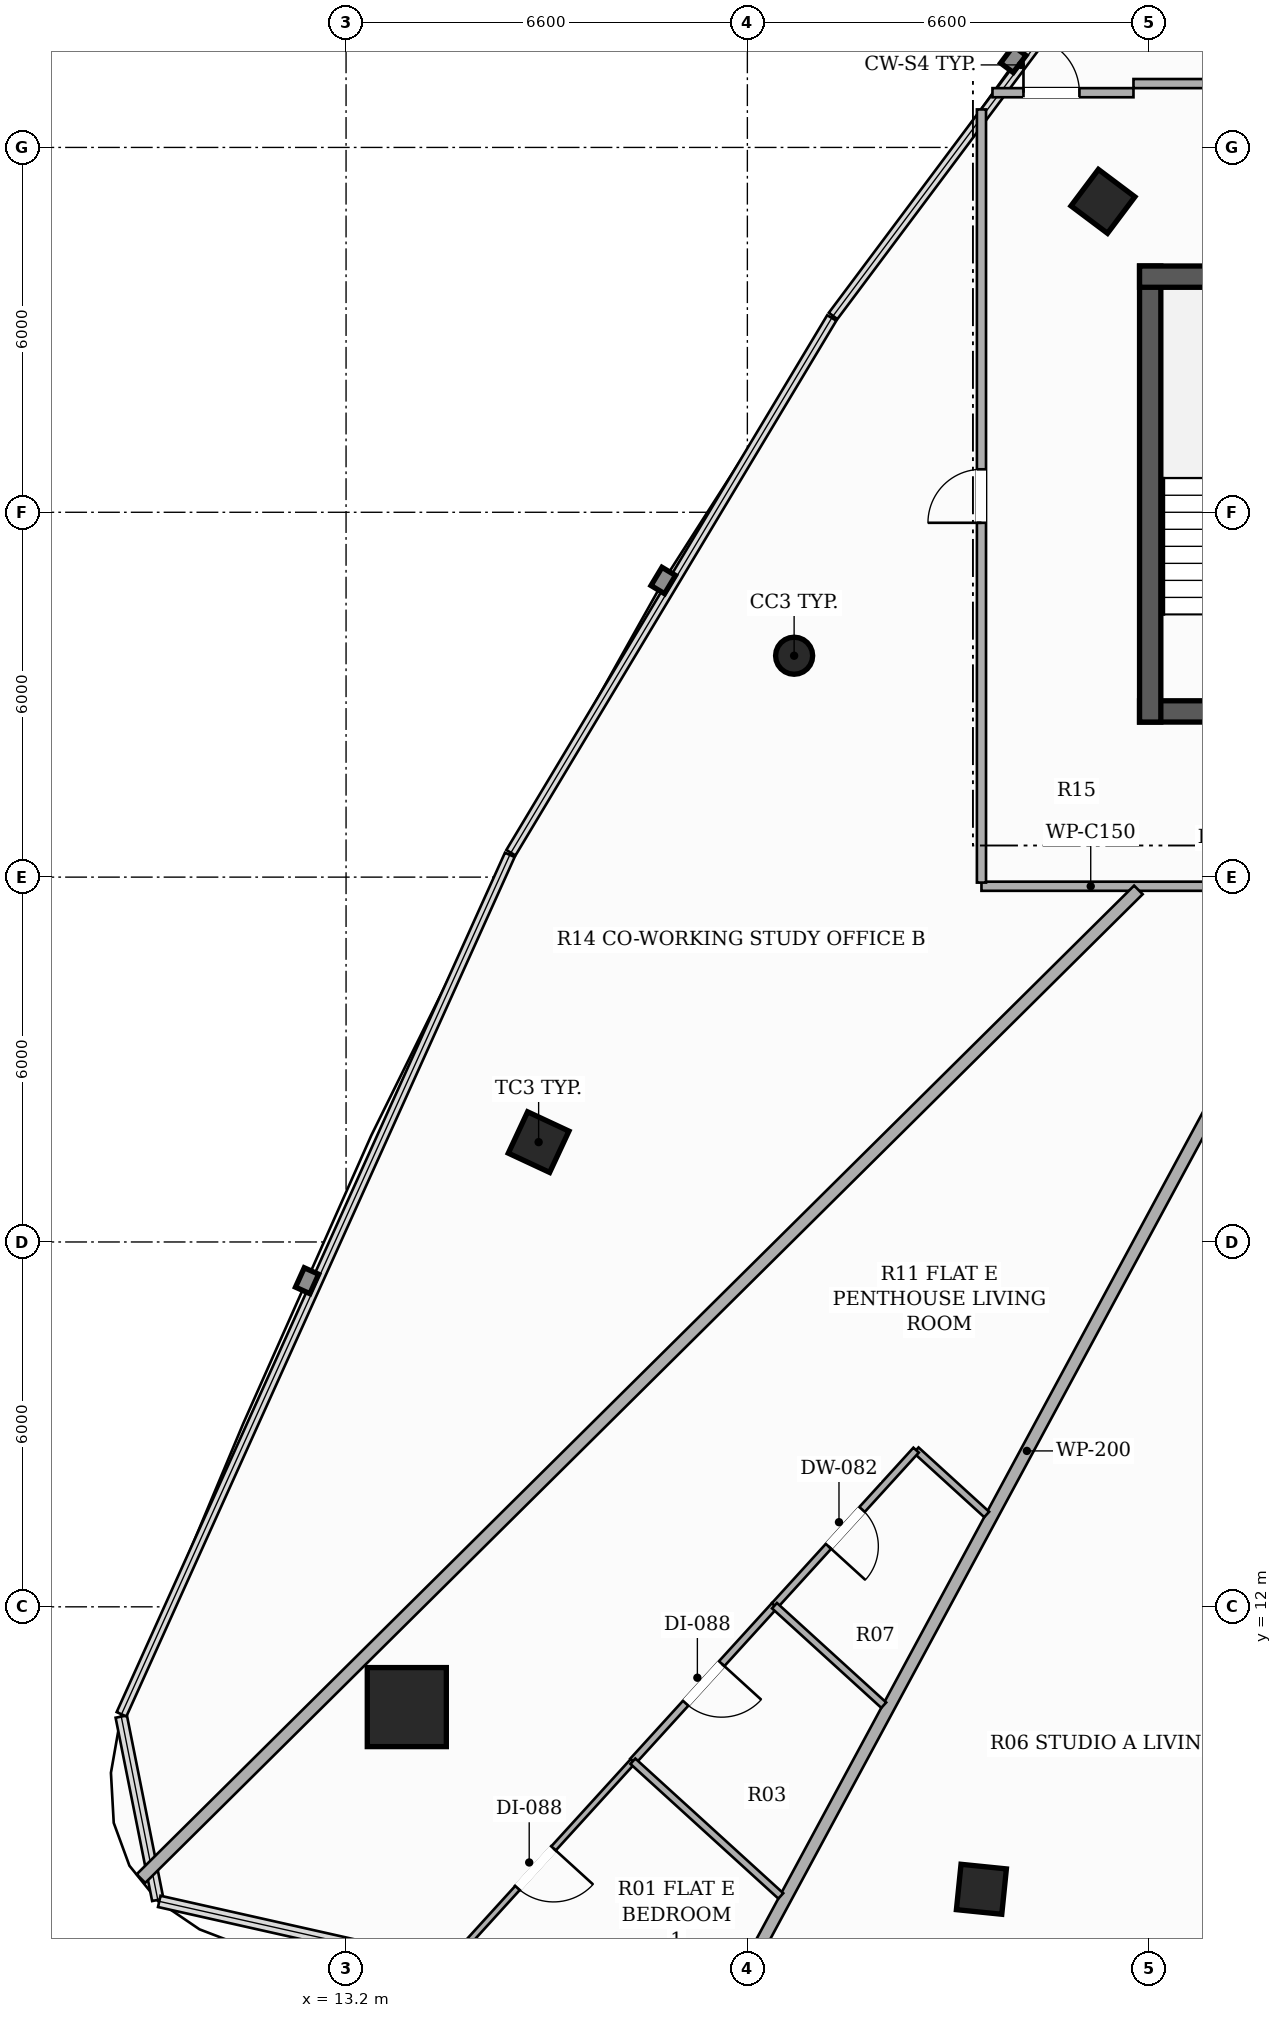
"""IFC4 building model, lengths in metres.
Left out: names, types, materials, properties, quantities, classifications, styles, units other than length and angle.
Written with IfcOpenShell. Run it as: python <this file> out.ifc"""

import sys

from ifc_helpers import new_model, si_unit, direction, frame, frame_2d, origin, origin_2d, place, context, subcontext, project, spatial, rectangle, hollow_rectangle, hollow_circle, extrude, element, fill, save


model = new_model("IFC4")
c1 = context("Model", 3, precision=1e-05, world=origin(), true_north=direction((0.0, 1.0)))
c2 = subcontext(c1, "Body", "Model", "MODEL_VIEW")
j1 = project(units=[si_unit("LENGTHUNIT", "METRE"), si_unit("PLANEANGLEUNIT", "RADIAN")], contexts=[c1])
p1 = place(None, origin())
s1 = spatial("IfcSite", under=j1, at=p1, CompositionType="ELEMENT")
p2 = place(p1, origin())
s2 = spatial("IfcBuilding", under=s1, at=p2, CompositionType="ELEMENT")
p3 = place(p2, frame((0.0, 0.0, 196.4)))
s3 = spatial("IfcBuildingStorey", under=s2, at=p3, CompositionType="ELEMENT", Elevation=196.4)
p4 = place(p3, frame((26.25, 26.725, 0.0), z_axis=(0.0, 0.0, 1.0), x_axis=(1.0, 0.0, 0.0)))
e1 = element("IfcWall", 1, at=p4, inside=s3, PredefinedType="SHEAR", context=c2, shape_type="SweptSolid", body=[
    extrude(rectangle(XDim=13.5, YDim=0.35, at=frame_2d((6.75, 0.0))), origin(), (0.0, 0.0, 1.0), 3.3),
])
p5 = place(p4, frame((4.35, 0.0, 0.0)))
e2 = element("IfcOpeningElement", 2, at=p5, cuts=e1, PredefinedType="OPENING", context=c2, shape_type="SweptSolid", body=[
    extrude(rectangle(XDim=1.05, YDim=2.15, at=frame_2d((0.525, 1.075))), frame((0.0, 0.185, 0.0), z_axis=(0.0, -1.0, 0.0), x_axis=(1.0, 0.0, 0.0)), (0.0, 0.0, 1.0), 0.37),
])
p6 = place(p4, frame((8.3, 0.0, 0.0)))
e3 = element("IfcOpeningElement", 3, at=p6, cuts=e1, PredefinedType="OPENING", context=c2, shape_type="SweptSolid", body=[
    extrude(rectangle(XDim=1.05, YDim=2.15, at=frame_2d((0.525, 1.075))), frame((0.0, 0.185, 0.0), z_axis=(0.0, -1.0, 0.0), x_axis=(1.0, 0.0, 0.0)), (0.0, 0.0, 1.0), 0.37),
])
p7 = place(p3, frame((26.425, 26.55, 0.0), z_axis=(0.0, 0.0, 1.0), x_axis=(0.0, 1.0, 0.0)))
e4 = element("IfcWall", 4, at=p7, inside=s3, PredefinedType="SHEAR", context=c2, shape_type="SweptSolid", body=[
    extrude(rectangle(XDim=7.5, YDim=0.35, at=frame_2d((3.75, 0.0))), origin(), (0.0, 0.0, 1.0), 3.3),
])
p8 = place(p3, frame((26.25, 33.875, 0.0), z_axis=(0.0, 0.0, 1.0), x_axis=(1.0, 0.0, 0.0)))
e5 = element("IfcWall", 5, at=p8, inside=s3, PredefinedType="SHEAR", context=c2, shape_type="SweptSolid", body=[
    extrude(rectangle(XDim=3.6, YDim=0.35, at=frame_2d((1.8, 0.0))), origin(), (0.0, 0.0, 1.0), 3.3),
])
p9 = place(p3, frame((14.199, 10.351, 0.0), z_axis=(0.0, 0.0, 1.0), x_axis=(1.0, 0.0, 0.0)))
e6 = element("IfcColumn", 6, at=p9, inside=s3, PredefinedType="COLUMN", context=c2, shape_type="SweptSolid", body=[
    extrude(hollow_rectangle(XDim=1.3, YDim=1.3, WallThickness=0.04, at=origin_2d()), origin(), (0.0, 0.0, 1.0), 3.3),
])
p10 = place(p3, frame((25.648, 35.113, 0.0), z_axis=(0.0, 0.0, 1.0), x_axis=(0.600420225326, 0.799684658487, 0.0)))
e7 = element("IfcColumn", 7, at=p10, inside=s3, PredefinedType="COLUMN", context=c2, shape_type="SweptSolid", body=[
    extrude(hollow_rectangle(XDim=0.75, YDim=0.75, WallThickness=0.025, at=origin_2d()), origin(), (0.0, 0.0, 1.0), 3.3),
])
p11 = place(p3, frame((20.569, 27.641, 0.0), z_axis=(0.0, 0.0, 1.0), x_axis=(1.0, 0.0, 0.0)))
e8 = element("IfcColumn", 8, at=p11, inside=s3, PredefinedType="COLUMN", context=c2, shape_type="SweptSolid", body=[
    extrude(hollow_circle(Radius=0.305, WallThickness=0.016, at=origin_2d()), origin(), (0.0, 0.0, 1.0), 3.3),
])
for number, where, z_axis, x_axis in (
    (9, (16.367, 19.642, 0.0), (0.0, 0.0, 1.0), (0.423, 0.906, 0.0)),
    (10, (23.649, 7.355, 0.0), (0.0, 0.0, 1.0), (-0.995, 0.101, 0.0)),
):
    element("IfcColumn", number, at=place(p3, frame(where, z_axis=z_axis, x_axis=x_axis)), inside=s3, PredefinedType="COLUMN", context=c2, shape_type="SweptSolid", body=[
        extrude(hollow_rectangle(XDim=0.75, YDim=0.75, WallThickness=0.025, at=origin_2d()), origin(), (0.0, 0.0, 1.0), 3.3),
    ])
p12 = place(p3, frame((32.027, 23.85, 0.0), z_axis=(0.0, 0.0, 1.0), x_axis=(-1.0, 0.0, 0.0)))
e11 = element("IfcWall", 11, at=p12, inside=s3, PredefinedType="PARTITIONING", context=c2, shape_type="SweptSolid", body=[
    extrude(rectangle(XDim=8.377, YDim=0.15, at=frame_2d((4.188, 0.0))), origin(), (0.0, 0.0, 1.0), 2.565),
])
p13 = place(p12, frame((1.014, 0.0, 0.0)))
e12 = element("IfcOpeningElement", 12, at=p13, cuts=e11, PredefinedType="OPENING", context=c2, shape_type="SweptSolid", body=[
    extrude(rectangle(XDim=0.92, YDim=2.15, at=frame_2d((0.46, 1.075))), frame((0.0, 0.085, 0.0), z_axis=(0.0, -1.0, 0.0), x_axis=(1.0, 0.0, 0.0)), (0.0, 0.0, 1.0), 0.17),
])
p14 = place(p12, frame((3.763, 0.0, 0.0)))
e13 = element("IfcOpeningElement", 13, at=p14, cuts=e11, PredefinedType="OPENING", context=c2, shape_type="SweptSolid", body=[
    extrude(rectangle(XDim=0.92, YDim=2.15, at=frame_2d((0.46, 1.075))), frame((0.0, 0.085, 0.0), z_axis=(0.0, -1.0, 0.0), x_axis=(1.0, 0.0, 0.0)), (0.0, 0.0, 1.0), 0.17),
])
p15 = place(p3, frame((23.65, 23.91, 0.0), z_axis=(0.0, 0.0, 1.0), x_axis=(0.0, 1.0, 0.0)))
e14 = element("IfcWall", 14, at=p15, inside=s3, PredefinedType="PARTITIONING", context=c2, shape_type="SweptSolid", body=[
    extrude(rectangle(XDim=12.715, YDim=0.15, at=frame_2d((6.357, 0.0))), origin(), (0.0, 0.0, 1.0), 2.492),
])
p16 = place(p15, frame((5.917, 0.0, 0.0)))
e15 = element("IfcOpeningElement", 15, at=p16, cuts=e14, PredefinedType="OPENING", context=c2, shape_type="SweptSolid", body=[
    extrude(rectangle(XDim=0.88, YDim=2.1, at=frame_2d((0.44, 1.05))), frame((0.0, 0.085, 0.0), z_axis=(0.0, -1.0, 0.0), x_axis=(1.0, 0.0, 0.0)), (0.0, 0.0, 1.0), 0.17),
])
p17 = place(p3, frame((23.831, 36.9, 0.0), z_axis=(0.0, 0.0, 1.0), x_axis=(1.0, 0.0, 0.0)))
e16 = element("IfcWall", 16, at=p17, inside=s3, PredefinedType="PARTITIONING", context=c2, shape_type="SweptSolid", body=[
    extrude(rectangle(XDim=2.319, YDim=0.15, at=frame_2d((1.159, 0.0))), origin(), (0.0, 0.0, 1.0), 2.619),
])
p18 = place(p17, frame((0.51, 0.0, 0.0)))
e17 = element("IfcOpeningElement", 17, at=p18, cuts=e16, PredefinedType="OPENING", context=c2, shape_type="SweptSolid", body=[
    extrude(rectangle(XDim=0.92, YDim=2.15, at=frame_2d((0.46, 1.075))), frame((0.0, 0.085, 0.0), z_axis=(0.0, -1.0, 0.0), x_axis=(1.0, 0.0, 0.0)), (0.0, 0.0, 1.0), 0.17),
])
p19 = place(p3, frame((26.15, 37.05, 0.0), z_axis=(0.0, 0.0, 1.0), x_axis=(1.0, 0.0, 0.0)))
e18 = element("IfcWall", 18, at=p19, inside=s3, PredefinedType="PARTITIONING", context=c2, shape_type="SweptSolid", body=[
    extrude(rectangle(XDim=4.3, YDim=0.15, at=frame_2d((2.15, 0.0))), origin(), (0.0, 0.0, 1.0), 2.425),
])
p20 = place(p3, frame((19.416, 5.338, 0.0), z_axis=(0.0, 0.0, 1.0), x_axis=(0.475065982754, 0.879950175879, 0.0)))
e19 = element("IfcWall", 19, at=p20, inside=s3, PredefinedType="PARTITIONING", context=c2, shape_type="SweptSolid", body=[
    extrude(rectangle(XDim=20.969, YDim=0.2, at=frame_2d((10.485, 0.0))), origin(), (0.0, 0.0, 1.0), 2.492),
])
p21 = place(p3, frame((26.231, 23.79, 0.0), z_axis=(0.0, 0.0, 1.0), x_axis=(-0.710239236144, -0.703960387693, 0.0)))
e20 = element("IfcWall", 20, at=p21, inside=s3, PredefinedType="PARTITIONING", context=c2, shape_type="SweptSolid", body=[
    extrude(rectangle(XDim=23.096, YDim=0.2, at=frame_2d((11.548, 0.0))), origin(), (0.0, 0.0, 1.0), 2.492),
])
p22 = place(p3, frame((23.736, 13.519, 0.0), z_axis=(0.0, 0.0, 1.0), x_axis=(-0.739215251716, 0.673469235846, 0.0)))
e21 = element("IfcWall", 21, at=p22, inside=s3, PredefinedType="PARTITIONING", context=c2, shape_type="SweptSolid", body=[
    extrude(rectangle(XDim=1.571, YDim=0.12, at=frame_2d((0.785, 0.0))), origin(), (0.0, 0.0, 1.0), 3.06),
])
p23 = place(p3, frame((22.575, 14.577, 0.0), z_axis=(0.0, 0.0, 1.0), x_axis=(-0.673231148277, -0.739432093563, 0.0)))
e22 = element("IfcWall", 22, at=p23, inside=s3, PredefinedType="PARTITIONING", context=c2, shape_type="SweptSolid", body=[
    extrude(rectangle(XDim=3.459, YDim=0.12, at=frame_2d((1.729, 0.0))), origin(), (0.0, 0.0, 1.0), 2.773),
])
p24 = place(p23, frame((1.32, 0.0, 0.0)))
e23 = element("IfcOpeningElement", 23, at=p24, cuts=e22, PredefinedType="OPENING", context=c2, shape_type="SweptSolid", body=[
    extrude(rectangle(XDim=0.82, YDim=2.1, at=frame_2d((0.41, 1.05))), frame((0.0, 0.07, 0.0), z_axis=(0.0, -1.0, 0.0), x_axis=(1.0, 0.0, 0.0)), (0.0, 0.0, 1.0), 0.14),
])
p25 = place(p3, frame((20.246, 12.019, 0.0), z_axis=(0.0, 0.0, 1.0), x_axis=(-0.673234602732, -0.739428948368, 0.0)))
e24 = element("IfcWall", 24, at=p25, inside=s3, PredefinedType="PARTITIONING", context=c2, shape_type="SweptSolid", body=[
    extrude(rectangle(XDim=3.459, YDim=0.12, at=frame_2d((1.73, 0.0))), origin(), (0.0, 0.0, 1.0), 2.492),
])
p26 = place(p25, frame((1.29, 0.0, 0.0)))
e25 = element("IfcOpeningElement", 25, at=p26, cuts=e24, PredefinedType="OPENING", context=c2, shape_type="SweptSolid", body=[
    extrude(rectangle(XDim=0.88, YDim=2.1, at=frame_2d((0.44, 1.05))), frame((0.0, 0.07, 0.0), z_axis=(0.0, -1.0, 0.0), x_axis=(1.0, 0.0, 0.0)), (0.0, 0.0, 1.0), 0.14),
])
p27 = place(p3, frame((17.917, 9.461, 0.0), z_axis=(0.0, 0.0, 1.0), x_axis=(-0.673104266943, -0.739547595374, 0.0)))
e26 = element("IfcWall", 26, at=p27, inside=s3, PredefinedType="PARTITIONING", context=c2, shape_type="SweptSolid", body=[
    extrude(rectangle(XDim=4.758, YDim=0.1, at=frame_2d((2.379, 0.0))), origin(), (0.0, 0.0, 1.0), 2.492),
])
p28 = place(p27, frame((1.939, 0.0, 0.0)))
e27 = element("IfcOpeningElement", 27, at=p28, cuts=e26, PredefinedType="OPENING", context=c2, shape_type="SweptSolid", body=[
    extrude(rectangle(XDim=0.88, YDim=2.1, at=frame_2d((0.44, 1.05))), frame((0.0, 0.06, 0.0), z_axis=(0.0, -1.0, 0.0), x_axis=(1.0, 0.0, 0.0)), (0.0, 0.0, 1.0), 0.12),
])
p29 = place(p3, frame((22.043, 10.383, 0.0), z_axis=(0.0, 0.0, 1.0), x_axis=(-0.739435258465, 0.673227672143, 0.0)))
e28 = element("IfcWall", 28, at=p29, inside=s3, PredefinedType="PARTITIONING", context=c2, shape_type="SweptSolid", body=[
    extrude(rectangle(XDim=2.43, YDim=0.12, at=frame_2d((1.215, 0.0))), origin(), (0.0, 0.0, 1.0), 2.773),
])
p30 = place(p3, frame((20.35, 7.246, 0.0), z_axis=(0.0, 0.0, 1.0), x_axis=(-0.739496715577, 0.673160164932, 0.0)))
e29 = element("IfcWall", 29, at=p30, inside=s3, PredefinedType="PARTITIONING", context=c2, shape_type="SweptSolid", body=[
    extrude(rectangle(XDim=3.29, YDim=0.12, at=frame_2d((1.645, 0.0))), origin(), (0.0, 0.0, 1.0), 2.492),
])
p31 = place(p16, origin())
e30 = element("IfcDoor", 30, at=p31, inside=s3, OperationType="SINGLE_SWING_LEFT", PredefinedType="DOOR", context=c2, shape_type="SweptSolid", body=[
    extrude(rectangle(XDim=0.88, YDim=2.1, at=frame_2d((0.44, 1.05))), frame((0.0, 0.025, 0.0), z_axis=(0.0, -1.0, 0.0), x_axis=(1.0, 0.0, 0.0)), (0.0, 0.0, 1.0), 0.05),
])
fill(e15, e30)
p32 = place(p24, origin())
e31 = element("IfcDoor", 31, at=p32, inside=s3, OperationType="SINGLE_SWING_RIGHT", PredefinedType="DOOR", context=c2, shape_type="SweptSolid", body=[
    extrude(rectangle(XDim=0.82, YDim=2.1, at=frame_2d((0.41, 1.05))), frame((0.0, 0.025, 0.0), z_axis=(0.0, -1.0, 0.0), x_axis=(1.0, 0.0, 0.0)), (0.0, 0.0, 1.0), 0.05),
])
fill(e23, e31)
p33 = place(p26, origin())
e32 = element("IfcDoor", 32, at=p33, inside=s3, OperationType="SINGLE_SWING_LEFT", PredefinedType="DOOR", context=c2, shape_type="SweptSolid", body=[
    extrude(rectangle(XDim=0.88, YDim=2.1, at=frame_2d((0.44, 1.05))), frame((0.0, 0.025, 0.0), z_axis=(0.0, -1.0, 0.0), x_axis=(1.0, 0.0, 0.0)), (0.0, 0.0, 1.0), 0.05),
])
fill(e25, e32)
p34 = place(p28, origin())
e33 = element("IfcDoor", 33, at=p34, inside=s3, OperationType="SINGLE_SWING_LEFT", PredefinedType="DOOR", context=c2, shape_type="SweptSolid", body=[
    extrude(rectangle(XDim=0.88, YDim=2.1, at=frame_2d((0.44, 1.05))), frame((0.0, 0.025, 0.0), z_axis=(0.0, -1.0, 0.0), x_axis=(1.0, 0.0, 0.0)), (0.0, 0.0, 1.0), 0.05),
])
fill(e27, e33)
p35 = place(p18, origin())
e34 = element("IfcDoor", 34, at=p35, inside=s3, OperationType="SINGLE_SWING_LEFT", PredefinedType="DOOR", context=c2, shape_type="SweptSolid", body=[
    extrude(rectangle(XDim=0.92, YDim=2.15, at=frame_2d((0.46, 1.075))), frame((0.0, 0.025, 0.0), z_axis=(0.0, -1.0, 0.0), x_axis=(1.0, 0.0, 0.0)), (0.0, 0.0, 1.0), 0.05),
])
fill(e17, e34)
save(model, sys.argv[1])
